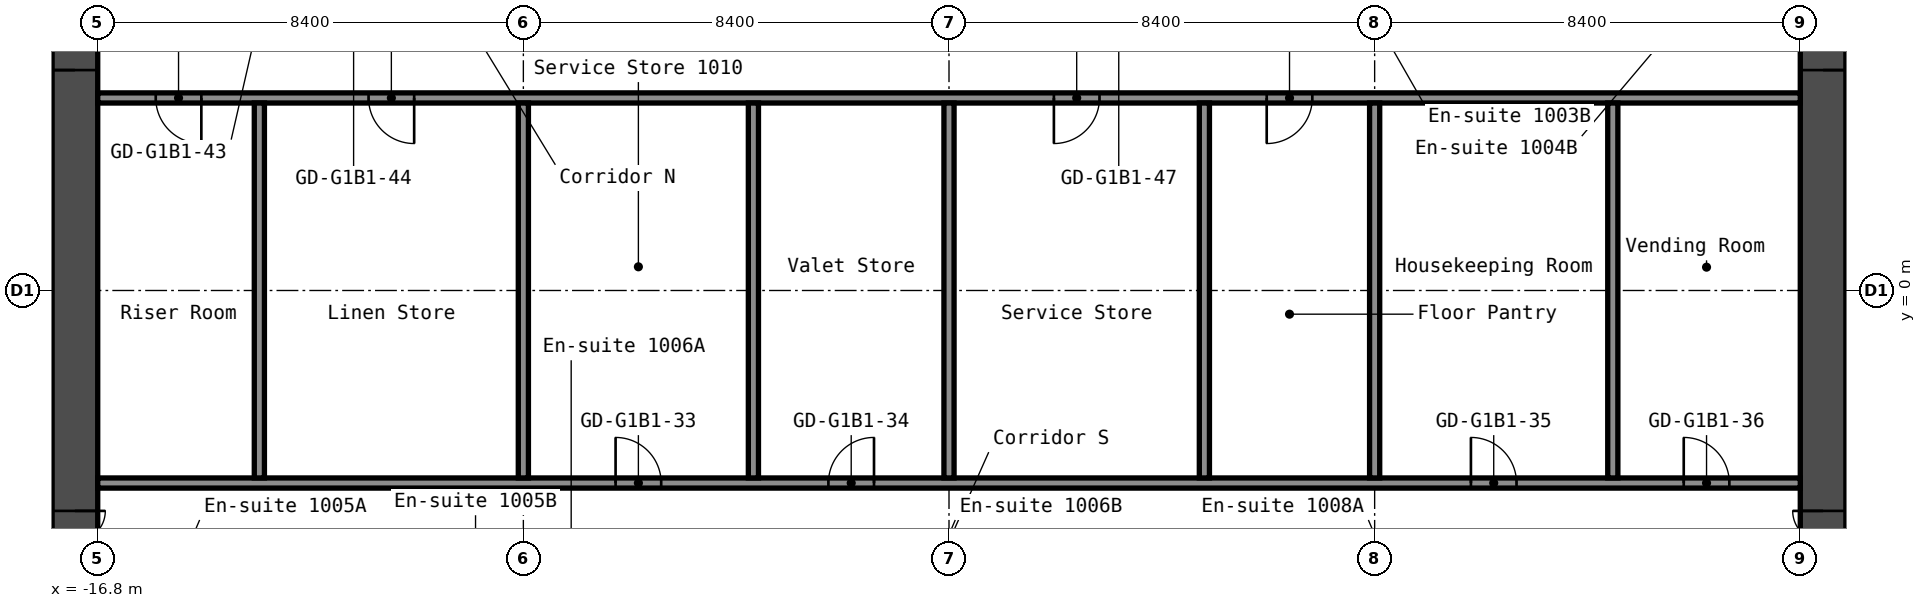
"""IFC4 building model, lengths in metres.
Left out: names, types, materials, properties, quantities, classifications, styles, units other than length and angle.
Written with IfcOpenShell. Run it as: python <this file> out.ifc"""

import sys

from ifc_helpers import new_model, si_unit, direction, frame, frame_2d, origin, place, context, subcontext, project, spatial, rectangle, extrude, element, fill, save


model = new_model("IFC4")
c1 = context("Model", 3, precision=1e-05, world=origin(), true_north=direction((0.0, 1.0)))
c2 = subcontext(c1, "Body", "Model", "MODEL_VIEW")
j1 = project(units=[si_unit("LENGTHUNIT", "METRE"), si_unit("PLANEANGLEUNIT", "RADIAN")], contexts=[c1])
p1 = place(None, origin())
s1 = spatial("IfcSite", under=j1, at=p1, CompositionType="ELEMENT")
p2 = place(p1, origin())
s2 = spatial("IfcBuilding", under=s1, at=p2, CompositionType="ELEMENT")
p3 = place(p2, frame((0.0, 0.0, 39.0)))
s3 = spatial("IfcBuildingStorey", under=s2, at=p3, CompositionType="ELEMENT", Elevation=39.0)
p4 = place(p3, frame((-17.25, -8.4, 0.0), z_axis=(0.0, 0.0, 1.0), x_axis=(0.0, 1.0, 0.0)))
e1 = element("IfcWall", 1, at=p4, inside=s3, PredefinedType="SHEAR", context=c2, shape_type="SweptSolid", body=[
    extrude(rectangle(XDim=16.8, YDim=0.9, at=frame_2d((8.4, 0.0))), origin(), (0.0, 0.0, 1.0), 2.8),
])
p5 = place(p4, frame((12.75, 0.0, 0.0)))
e2 = element("IfcOpeningElement", 2, at=p5, cuts=e1, PredefinedType="OPENING", context=c2, shape_type="SweptSolid", body=[
    extrude(rectangle(XDim=1.2, YDim=2.1, at=frame_2d((0.6, 1.05))), frame((0.0, 0.46, 0.0), z_axis=(0.0, -1.0, 0.0), x_axis=(1.0, 0.0, 0.0)), (0.0, 0.0, 1.0), 0.92),
])
p6 = place(p4, frame((2.85, 0.0, 0.0)))
e3 = element("IfcOpeningElement", 3, at=p6, cuts=e1, PredefinedType="OPENING", context=c2, shape_type="SweptSolid", body=[
    extrude(rectangle(XDim=1.2, YDim=2.1, at=frame_2d((0.6, 1.05))), frame((0.0, 0.46, 0.0), z_axis=(0.0, -1.0, 0.0), x_axis=(1.0, 0.0, 0.0)), (0.0, 0.0, 1.0), 0.92),
])
p7 = place(p3, frame((17.25, -8.4, 0.0), z_axis=(0.0, 0.0, 1.0), x_axis=(0.0, 1.0, 0.0)))
e4 = element("IfcWall", 4, at=p7, inside=s3, PredefinedType="SHEAR", context=c2, shape_type="SweptSolid", body=[
    extrude(rectangle(XDim=16.8, YDim=0.9, at=frame_2d((8.4, 0.0))), origin(), (0.0, 0.0, 1.0), 2.8),
])
p8 = place(p7, frame((12.75, 0.0, 0.0)))
e5 = element("IfcOpeningElement", 5, at=p8, cuts=e4, PredefinedType="OPENING", context=c2, shape_type="SweptSolid", body=[
    extrude(rectangle(XDim=1.2, YDim=2.1, at=frame_2d((0.6, 1.05))), frame((0.0, 0.46, 0.0), z_axis=(0.0, -1.0, 0.0), x_axis=(1.0, 0.0, 0.0)), (0.0, 0.0, 1.0), 0.92),
])
p9 = place(p7, frame((2.85, 0.0, 0.0)))
e6 = element("IfcOpeningElement", 6, at=p9, cuts=e4, PredefinedType="OPENING", context=c2, shape_type="SweptSolid", body=[
    extrude(rectangle(XDim=1.2, YDim=2.1, at=frame_2d((0.6, 1.05))), frame((0.0, 0.46, 0.0), z_axis=(0.0, -1.0, 0.0), x_axis=(1.0, 0.0, 0.0)), (0.0, 0.0, 1.0), 0.92),
])
p10 = place(p3, frame((-16.8, -3.8, 0.0), z_axis=(0.0, 0.0, 1.0), x_axis=(1.0, 0.0, 0.0)))
e7 = element("IfcWall", 7, at=p10, inside=s3, PredefinedType="PARTITIONING", context=c2, shape_type="SweptSolid", body=[
    extrude(rectangle(XDim=33.6, YDim=0.2, at=frame_2d((16.8, 0.0))), origin(), (0.0, 0.0, 1.0), 2.8),
])
p11 = place(p10, frame((10.22, 0.0, 0.0)))
e8 = element("IfcOpeningElement", 8, at=p11, cuts=e7, PredefinedType="OPENING", context=c2, shape_type="SweptSolid", body=[
    extrude(rectangle(XDim=0.9, YDim=2.1, at=frame_2d((0.45, 1.05))), frame((0.0, 0.11, 0.0), z_axis=(0.0, -1.0, 0.0), x_axis=(1.0, 0.0, 0.0)), (0.0, 0.0, 1.0), 0.22),
])
p12 = place(p10, frame((14.42, 0.0, 0.0)))
e9 = element("IfcOpeningElement", 9, at=p12, cuts=e7, PredefinedType="OPENING", context=c2, shape_type="SweptSolid", body=[
    extrude(rectangle(XDim=0.9, YDim=2.1, at=frame_2d((0.45, 1.05))), frame((0.0, 0.11, 0.0), z_axis=(0.0, -1.0, 0.0), x_axis=(1.0, 0.0, 0.0)), (0.0, 0.0, 1.0), 0.22),
])
p13 = place(p10, frame((27.1, 0.0, 0.0)))
e10 = element("IfcOpeningElement", 10, at=p13, cuts=e7, PredefinedType="OPENING", context=c2, shape_type="SweptSolid", body=[
    extrude(rectangle(XDim=0.9, YDim=2.1, at=frame_2d((0.45, 1.05))), frame((0.0, 0.11, 0.0), z_axis=(0.0, -1.0, 0.0), x_axis=(1.0, 0.0, 0.0)), (0.0, 0.0, 1.0), 0.22),
])
p14 = place(p10, frame((31.3, 0.0, 0.0)))
e11 = element("IfcOpeningElement", 11, at=p14, cuts=e7, PredefinedType="OPENING", context=c2, shape_type="SweptSolid", body=[
    extrude(rectangle(XDim=0.9, YDim=2.1, at=frame_2d((0.45, 1.05))), frame((0.0, 0.11, 0.0), z_axis=(0.0, -1.0, 0.0), x_axis=(1.0, 0.0, 0.0)), (0.0, 0.0, 1.0), 0.22),
])
p15 = place(p3, frame((-16.8, 3.8, 0.0), z_axis=(0.0, 0.0, 1.0), x_axis=(1.0, 0.0, 0.0)))
e12 = element("IfcWall", 12, at=p15, inside=s3, PredefinedType="PARTITIONING", context=c2, shape_type="SweptSolid", body=[
    extrude(rectangle(XDim=33.6, YDim=0.2, at=frame_2d((16.8, 0.0))), origin(), (0.0, 0.0, 1.0), 2.8),
])
p16 = place(p15, frame((1.145, 0.0, 0.0)))
e13 = element("IfcOpeningElement", 13, at=p16, cuts=e12, PredefinedType="OPENING", context=c2, shape_type="SweptSolid", body=[
    extrude(rectangle(XDim=0.9, YDim=2.1, at=frame_2d((0.45, 1.05))), frame((0.0, 0.11, 0.0), z_axis=(0.0, -1.0, 0.0), x_axis=(1.0, 0.0, 0.0)), (0.0, 0.0, 1.0), 0.22),
])
p17 = place(p15, frame((5.345, 0.0, 0.0)))
e14 = element("IfcOpeningElement", 14, at=p17, cuts=e12, PredefinedType="OPENING", context=c2, shape_type="SweptSolid", body=[
    extrude(rectangle(XDim=0.9, YDim=2.1, at=frame_2d((0.45, 1.05))), frame((0.0, 0.11, 0.0), z_axis=(0.0, -1.0, 0.0), x_axis=(1.0, 0.0, 0.0)), (0.0, 0.0, 1.0), 0.22),
])
p18 = place(p15, frame((18.87, 0.0, 0.0)))
e15 = element("IfcOpeningElement", 15, at=p18, cuts=e12, PredefinedType="OPENING", context=c2, shape_type="SweptSolid", body=[
    extrude(rectangle(XDim=0.9, YDim=2.1, at=frame_2d((0.45, 1.05))), frame((0.0, 0.11, 0.0), z_axis=(0.0, -1.0, 0.0), x_axis=(1.0, 0.0, 0.0)), (0.0, 0.0, 1.0), 0.22),
])
p19 = place(p15, frame((23.07, 0.0, 0.0)))
e16 = element("IfcOpeningElement", 16, at=p19, cuts=e12, PredefinedType="OPENING", context=c2, shape_type="SweptSolid", body=[
    extrude(rectangle(XDim=0.9, YDim=2.1, at=frame_2d((0.45, 1.05))), frame((0.0, 0.11, 0.0), z_axis=(0.0, -1.0, 0.0), x_axis=(1.0, 0.0, 0.0)), (0.0, 0.0, 1.0), 0.22),
])
for number, where, z_axis, x_axis in (
    (17, (-13.61, -3.7, 0.0), (0.0, 0.0, 1.0), (0.0, 1.0, 0.0)),
    (18, (-8.4, -3.7, 0.0), (0.0, 0.0, 1.0), (0.0, 1.0, 0.0)),
    (19, (-3.86, -3.7, 0.0), (0.0, 0.0, 1.0), (0.0, 1.0, 0.0)),
    (20, (0.0, -3.7, 0.0), (0.0, 0.0, 1.0), (0.0, 1.0, 0.0)),
    (21, (5.04, -3.7, 0.0), (0.0, 0.0, 1.0), (0.0, 1.0, 0.0)),
    (22, (8.4, -3.7, 0.0), (0.0, 0.0, 1.0), (0.0, 1.0, 0.0)),
    (23, (13.1, -3.7, 0.0), (0.0, 0.0, 1.0), (0.0, 1.0, 0.0)),
):
    element("IfcWall", number, at=place(p3, frame(where, z_axis=z_axis, x_axis=x_axis)), inside=s3, PredefinedType="PARTITIONING", context=c2, shape_type="SweptSolid", body=[
        extrude(rectangle(XDim=7.4, YDim=0.2, at=frame_2d((3.7, 0.0))), origin(), (0.0, 0.0, 1.0), 2.8),
    ])
p20 = place(p5, origin())
e24 = element("IfcDoor", 24, at=p20, inside=s3, OperationType="DOUBLE_DOOR_SINGLE_SWING", PredefinedType="DOOR", context=c2, shape_type="SweptSolid", body=[
    extrude(rectangle(XDim=1.2, YDim=2.1, at=frame_2d((0.6, 1.05))), frame((0.0, 0.025, 0.0), z_axis=(0.0, -1.0, 0.0), x_axis=(1.0, 0.0, 0.0)), (0.0, 0.0, 1.0), 0.05),
])
fill(e2, e24)
p21 = place(p6, origin())
e25 = element("IfcDoor", 25, at=p21, inside=s3, OperationType="DOUBLE_DOOR_SINGLE_SWING", PredefinedType="DOOR", context=c2, shape_type="SweptSolid", body=[
    extrude(rectangle(XDim=1.2, YDim=2.1, at=frame_2d((0.6, 1.05))), frame((0.0, 0.025, 0.0), z_axis=(0.0, -1.0, 0.0), x_axis=(1.0, 0.0, 0.0)), (0.0, 0.0, 1.0), 0.05),
])
fill(e3, e25)
p22 = place(p8, origin())
e26 = element("IfcDoor", 26, at=p22, inside=s3, OperationType="DOUBLE_DOOR_SINGLE_SWING", PredefinedType="DOOR", context=c2, shape_type="SweptSolid", body=[
    extrude(rectangle(XDim=1.2, YDim=2.1, at=frame_2d((0.6, 1.05))), frame((0.0, 0.025, 0.0), z_axis=(0.0, -1.0, 0.0), x_axis=(1.0, 0.0, 0.0)), (0.0, 0.0, 1.0), 0.05),
])
fill(e5, e26)
p23 = place(p9, origin())
e27 = element("IfcDoor", 27, at=p23, inside=s3, OperationType="DOUBLE_DOOR_SINGLE_SWING", PredefinedType="DOOR", context=c2, shape_type="SweptSolid", body=[
    extrude(rectangle(XDim=1.2, YDim=2.1, at=frame_2d((0.6, 1.05))), frame((0.0, 0.025, 0.0), z_axis=(0.0, -1.0, 0.0), x_axis=(1.0, 0.0, 0.0)), (0.0, 0.0, 1.0), 0.05),
])
fill(e6, e27)
p24 = place(p11, origin())
e28 = element("IfcDoor", 28, at=p24, inside=s3, OperationType="SINGLE_SWING_RIGHT", PredefinedType="DOOR", context=c2, shape_type="SweptSolid", body=[
    extrude(rectangle(XDim=0.9, YDim=2.1, at=frame_2d((0.45, 1.05))), frame((0.0, 0.025, 0.0), z_axis=(0.0, -1.0, 0.0), x_axis=(1.0, 0.0, 0.0)), (0.0, 0.0, 1.0), 0.05),
])
fill(e8, e28)
p25 = place(p12, origin())
e29 = element("IfcDoor", 29, at=p25, inside=s3, OperationType="SINGLE_SWING_LEFT", PredefinedType="DOOR", context=c2, shape_type="SweptSolid", body=[
    extrude(rectangle(XDim=0.9, YDim=2.1, at=frame_2d((0.45, 1.05))), frame((0.0, 0.025, 0.0), z_axis=(0.0, -1.0, 0.0), x_axis=(1.0, 0.0, 0.0)), (0.0, 0.0, 1.0), 0.05),
])
fill(e9, e29)
p26 = place(p13, origin())
e30 = element("IfcDoor", 30, at=p26, inside=s3, OperationType="SINGLE_SWING_RIGHT", PredefinedType="DOOR", context=c2, shape_type="SweptSolid", body=[
    extrude(rectangle(XDim=0.9, YDim=2.1, at=frame_2d((0.45, 1.05))), frame((0.0, 0.025, 0.0), z_axis=(0.0, -1.0, 0.0), x_axis=(1.0, 0.0, 0.0)), (0.0, 0.0, 1.0), 0.05),
])
fill(e10, e30)
p27 = place(p14, origin())
e31 = element("IfcDoor", 31, at=p27, inside=s3, OperationType="SINGLE_SWING_RIGHT", PredefinedType="DOOR", context=c2, shape_type="SweptSolid", body=[
    extrude(rectangle(XDim=0.9, YDim=2.1, at=frame_2d((0.45, 1.05))), frame((0.0, 0.025, 0.0), z_axis=(0.0, -1.0, 0.0), x_axis=(1.0, 0.0, 0.0)), (0.0, 0.0, 1.0), 0.05),
])
fill(e11, e31)
p28 = place(p16, origin())
e32 = element("IfcDoor", 32, at=p28, inside=s3, OperationType="SINGLE_SWING_RIGHT", PredefinedType="DOOR", context=c2, shape_type="SweptSolid", body=[
    extrude(rectangle(XDim=0.9, YDim=2.1, at=frame_2d((0.45, 1.05))), frame((0.0, 0.025, 0.0), z_axis=(0.0, -1.0, 0.0), x_axis=(1.0, 0.0, 0.0)), (0.0, 0.0, 1.0), 0.05),
])
fill(e13, e32)
p29 = place(p17, origin())
e33 = element("IfcDoor", 33, at=p29, inside=s3, OperationType="SINGLE_SWING_RIGHT", PredefinedType="DOOR", context=c2, shape_type="SweptSolid", body=[
    extrude(rectangle(XDim=0.9, YDim=2.1, at=frame_2d((0.45, 1.05))), frame((0.0, 0.025, 0.0), z_axis=(0.0, -1.0, 0.0), x_axis=(1.0, 0.0, 0.0)), (0.0, 0.0, 1.0), 0.05),
])
fill(e14, e33)
p30 = place(p18, origin())
e34 = element("IfcDoor", 34, at=p30, inside=s3, OperationType="SINGLE_SWING_LEFT", PredefinedType="DOOR", context=c2, shape_type="SweptSolid", body=[
    extrude(rectangle(XDim=0.9, YDim=2.1, at=frame_2d((0.45, 1.05))), frame((0.0, 0.025, 0.0), z_axis=(0.0, -1.0, 0.0), x_axis=(1.0, 0.0, 0.0)), (0.0, 0.0, 1.0), 0.05),
])
fill(e15, e34)
p31 = place(p19, origin())
e35 = element("IfcDoor", 35, at=p31, inside=s3, OperationType="SINGLE_SWING_LEFT", PredefinedType="DOOR", context=c2, shape_type="SweptSolid", body=[
    extrude(rectangle(XDim=0.9, YDim=2.1, at=frame_2d((0.45, 1.05))), frame((0.0, 0.025, 0.0), z_axis=(0.0, -1.0, 0.0), x_axis=(1.0, 0.0, 0.0)), (0.0, 0.0, 1.0), 0.05),
])
fill(e16, e35)
save(model, sys.argv[1])
